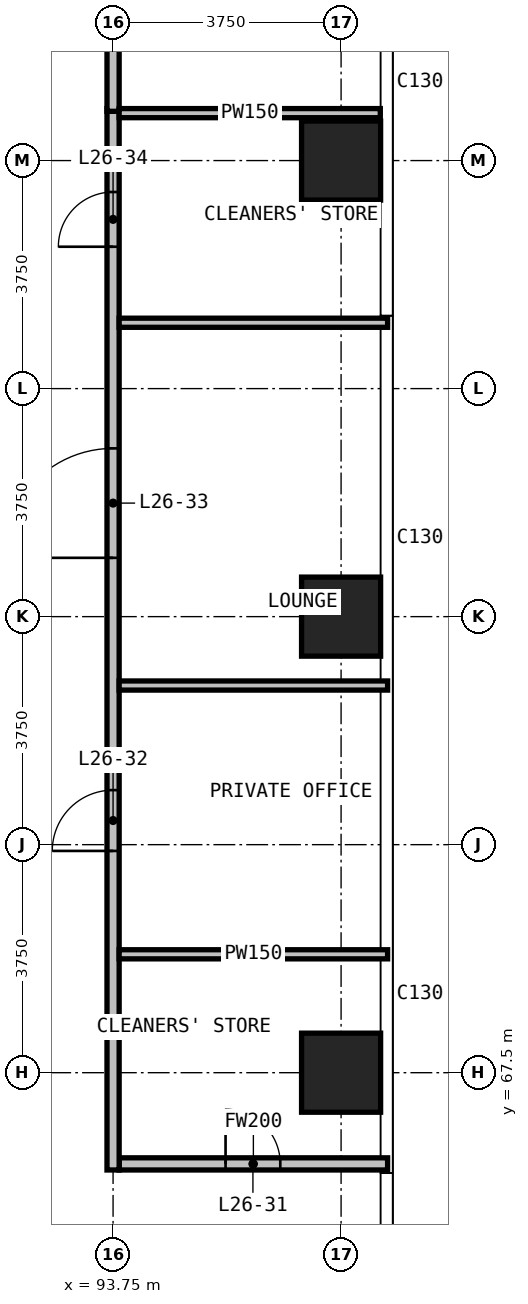
"""IFC4 building model, lengths in metres.
Left out: names, types, materials, properties, quantities, classifications, styles, units other than length and angle.
Written with IfcOpenShell. Run it as: python <this file> out.ifc"""

import sys

from ifc_helpers import new_model, si_unit, direction, frame, frame_2d, origin, origin_2d, place, context, subcontext, project, spatial, rectangle, extrude, element, fill, save


model = new_model("IFC4")
c1 = context("Model", 3, precision=1e-05, world=origin(), true_north=direction((0.0, 1.0)))
c2 = subcontext(c1, "Body", "Model", "MODEL_VIEW")
j1 = project(units=[si_unit("LENGTHUNIT", "METRE"), si_unit("PLANEANGLEUNIT", "RADIAN")], contexts=[c1])
p1 = place(None, origin())
s1 = spatial("IfcSite", under=j1, at=p1, CompositionType="ELEMENT")
p2 = place(p1, origin())
s2 = spatial("IfcBuilding", under=s1, at=p2, CompositionType="ELEMENT")
p3 = place(p2, frame((0.0, 0.0, 107.2)))
s3 = spatial("IfcBuildingStorey", under=s2, at=p3, CompositionType="ELEMENT", Elevation=107.2)
for number, where, z_axis, x_axis in (
    (1, (97.5, 67.5, 0.0), (0.0, 0.0, 1.0), (1.0, 0.0, 0.0)),
    (2, (97.5, 75.0, 0.0), (0.0, 0.0, 1.0), (1.0, 0.0, 0.0)),
    (3, (97.5, 82.5, 0.0), (0.0, 0.0, 1.0), (1.0, 0.0, 0.0)),
):
    element("IfcColumn", number, at=place(p3, frame(where, z_axis=z_axis, x_axis=x_axis)), inside=s3, PredefinedType="COLUMN", context=c2, shape_type="SweptSolid", body=[
        extrude(rectangle(XDim=1.3, YDim=1.3, at=origin_2d()), origin(), (0.0, 0.0, 1.0), 3.6),
    ])
p4 = place(p3, frame((93.85, 66.0, 0.0), z_axis=(0.0, 0.0, 1.0), x_axis=(1.0, 0.0, 0.0)))
e4 = element("IfcWall", 4, at=p4, inside=s3, PredefinedType="PARTITIONING", context=c2, shape_type="SweptSolid", body=[
    extrude(rectangle(XDim=4.415, YDim=0.2, at=frame_2d((2.208, 0.0))), origin(), (0.0, 0.0, 1.0), 3.3),
])
p5 = place(p4, frame((1.75, 0.0, 0.0)))
e5 = element("IfcOpeningElement", 5, at=p5, cuts=e4, PredefinedType="OPENING", context=c2, shape_type="SweptSolid", body=[
    extrude(rectangle(XDim=0.9, YDim=2.2, at=frame_2d((0.45, 1.1))), frame((0.0, 0.11, 0.0), z_axis=(0.0, -1.0, 0.0), x_axis=(1.0, 0.0, 0.0)), (0.0, 0.0, 1.0), 0.22),
])
p6 = place(p3, frame((93.75, 65.9, 0.0), z_axis=(0.0, 0.0, 1.0), x_axis=(0.0, 1.0, 0.0)))
e6 = element("IfcWall", 6, at=p6, inside=s3, PredefinedType="PARTITIONING", context=c2, shape_type="SweptSolid", body=[
    extrude(rectangle(XDim=17.455, YDim=0.2, at=frame_2d((8.728, 0.0))), origin(), (0.0, 0.0, 1.0), 3.3),
])
p7 = place(p6, frame((5.247, 0.0, 0.0)))
e7 = element("IfcOpeningElement", 7, at=p7, cuts=e6, PredefinedType="OPENING", context=c2, shape_type="SweptSolid", body=[
    extrude(rectangle(XDim=1.0, YDim=2.2, at=frame_2d((0.5, 1.1))), frame((0.0, 0.11, 0.0), z_axis=(0.0, -1.0, 0.0), x_axis=(1.0, 0.0, 0.0)), (0.0, 0.0, 1.0), 0.22),
])
p8 = place(p6, frame((10.067, 0.0, 0.0)))
e8 = element("IfcOpeningElement", 8, at=p8, cuts=e6, PredefinedType="OPENING", context=c2, shape_type="SweptSolid", body=[
    extrude(rectangle(XDim=1.8, YDim=2.2, at=frame_2d((0.9, 1.1))), frame((0.0, 0.11, 0.0), z_axis=(0.0, -1.0, 0.0), x_axis=(1.0, 0.0, 0.0)), (0.0, 0.0, 1.0), 0.22),
])
p9 = place(p6, frame((15.183, 0.0, 0.0)))
e9 = element("IfcOpeningElement", 9, at=p9, cuts=e6, PredefinedType="OPENING", context=c2, shape_type="SweptSolid", body=[
    extrude(rectangle(XDim=0.9, YDim=2.2, at=frame_2d((0.45, 1.1))), frame((0.0, 0.11, 0.0), z_axis=(0.0, -1.0, 0.0), x_axis=(1.0, 0.0, 0.0)), (0.0, 0.0, 1.0), 0.22),
])
p10 = place(p3, frame((93.75, 83.31, 0.0), z_axis=(0.0, 0.0, 1.0), x_axis=(0.0, 1.0, 0.0)))
e10 = element("IfcWall", 10, at=p10, inside=s3, PredefinedType="PARTITIONING", context=c2, shape_type="SweptSolid", body=[
    extrude(rectangle(XDim=7.335, YDim=0.2, at=frame_2d((3.667, 0.0))), origin(), (0.0, 0.0, 1.0), 3.3),
])
for number, where, z_axis, x_axis in (
    (11, (93.85, 69.447, 0.0), (0.0, 0.0, 1.0), (1.0, 0.0, 0.0)),
    (12, (93.85, 73.867, 0.0), (0.0, 0.0, 1.0), (1.0, 0.0, 0.0)),
    (13, (93.85, 79.833, 0.0), (0.0, 0.0, 1.0), (1.0, 0.0, 0.0)),
):
    element("IfcWall", number, at=place(p3, frame(where, z_axis=z_axis, x_axis=x_axis)), inside=s3, PredefinedType="PARTITIONING", context=c2, shape_type="SweptSolid", body=[
        extrude(rectangle(XDim=4.415, YDim=0.15, at=frame_2d((2.208, 0.0))), origin(), (0.0, 0.0, 1.0), 3.3),
    ])
p11 = place(p3, frame((93.85, 83.28, 0.0), z_axis=(0.0, 0.0, 1.0), x_axis=(1.0, 0.0, 0.0)))
e14 = element("IfcWall", 14, at=p11, inside=s3, PredefinedType="PARTITIONING", context=c2, shape_type="SweptSolid", body=[
    extrude(rectangle(XDim=4.295, YDim=0.15, at=frame_2d((2.147, 0.0))), origin(), (0.0, 0.0, 1.0), 3.3),
])
p12 = place(p5, origin())
e15 = element("IfcDoor", 15, at=p12, inside=s3, OperationType="SINGLE_SWING_RIGHT", PredefinedType="DOOR", context=c2, shape_type="SweptSolid", body=[
    extrude(rectangle(XDim=0.9, YDim=2.2, at=frame_2d((0.45, 1.1))), frame((0.0, 0.025, 0.0), z_axis=(0.0, -1.0, 0.0), x_axis=(1.0, 0.0, 0.0)), (0.0, 0.0, 1.0), 0.05),
])
fill(e5, e15)
p13 = place(p7, origin())
e16 = element("IfcDoor", 16, at=p13, inside=s3, OperationType="SINGLE_SWING_LEFT", PredefinedType="DOOR", context=c2, shape_type="SweptSolid", body=[
    extrude(rectangle(XDim=1.0, YDim=2.2, at=frame_2d((0.5, 1.1))), frame((0.0, 0.025, 0.0), z_axis=(0.0, -1.0, 0.0), x_axis=(1.0, 0.0, 0.0)), (0.0, 0.0, 1.0), 0.05),
])
fill(e7, e16)
p14 = place(p8, origin())
e17 = element("IfcDoor", 17, at=p14, inside=s3, OperationType="DOUBLE_DOOR_SINGLE_SWING", PredefinedType="DOOR", context=c2, shape_type="SweptSolid", body=[
    extrude(rectangle(XDim=1.8, YDim=2.2, at=frame_2d((0.9, 1.1))), frame((0.0, 0.025, 0.0), z_axis=(0.0, -1.0, 0.0), x_axis=(1.0, 0.0, 0.0)), (0.0, 0.0, 1.0), 0.05),
])
fill(e8, e17)
p15 = place(p9, origin())
e18 = element("IfcDoor", 18, at=p15, inside=s3, OperationType="SINGLE_SWING_LEFT", PredefinedType="DOOR", context=c2, shape_type="SweptSolid", body=[
    extrude(rectangle(XDim=0.9, YDim=2.2, at=frame_2d((0.45, 1.1))), frame((0.0, 0.025, 0.0), z_axis=(0.0, -1.0, 0.0), x_axis=(1.0, 0.0, 0.0)), (0.0, 0.0, 1.0), 0.05),
])
fill(e9, e18)
save(model, sys.argv[1])
